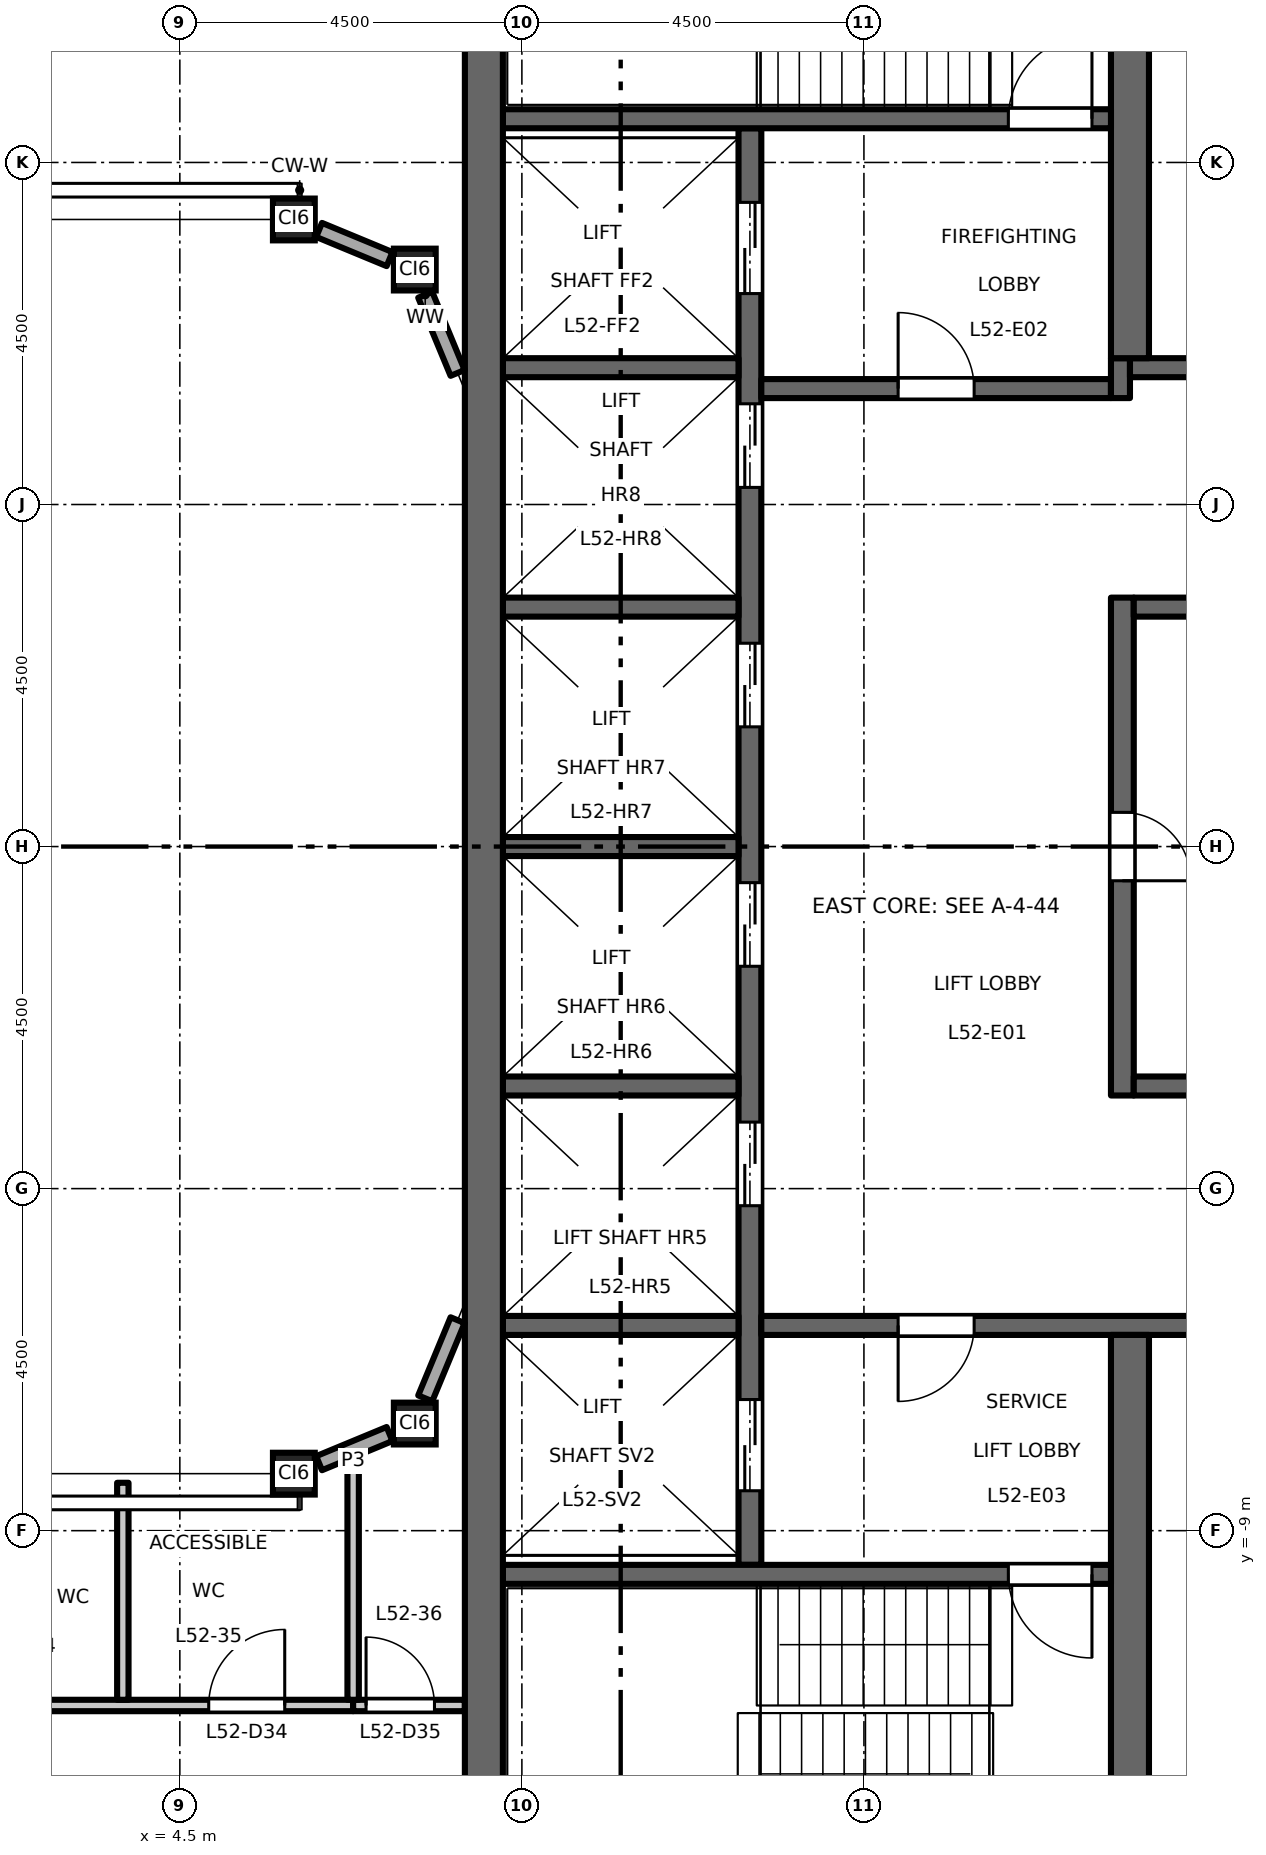
"""IFC4 building model, lengths in metres.
Left out: names, types, materials, properties, quantities, classifications, styles, units other than length and angle.
Written with IfcOpenShell. Run it as: python <this file> out.ifc"""

import sys

from ifc_helpers import new_model, si_unit, direction, frame, frame_2d, origin, origin_2d, place, context, subcontext, project, spatial, rectangle, hollow_rectangle, extrude, element, fill, save


model = new_model("IFC4")
c1 = context("Model", 3, precision=1e-05, world=origin(), true_north=direction((0.0, 1.0)))
c2 = subcontext(c1, "Body", "Model", "MODEL_VIEW")
j1 = project(units=[si_unit("LENGTHUNIT", "METRE"), si_unit("PLANEANGLEUNIT", "RADIAN")], contexts=[c1])
p1 = place(None, origin())
s1 = spatial("IfcSite", under=j1, at=p1, CompositionType="ELEMENT")
p2 = place(p1, origin())
s2 = spatial("IfcBuilding", under=s1, at=p2, CompositionType="ELEMENT")
p3 = place(p2, frame((0.0, 0.0, 242.2)))
s3 = spatial("IfcBuildingStorey", under=s2, at=p3, CompositionType="ELEMENT", Elevation=242.2)
for number, where, z_axis, x_axis in (
    (1, (6.0, -8.25, 0.0), (0.0, 0.0, 1.0), (1.0, 0.0, 0.0)),
    (2, (7.591, -7.591, 0.0), (0.0, 0.0, 1.0), (1.0, 0.0, 0.0)),
    (3, (6.0, 8.25, 0.0), (0.0, 0.0, 1.0), (1.0, 0.0, 0.0)),
    (4, (7.591, 7.591, 0.0), (0.0, 0.0, 1.0), (1.0, 0.0, 0.0)),
):
    element("IfcColumn", number, at=place(p3, frame(where, z_axis=z_axis, x_axis=x_axis)), inside=s3, PredefinedType="COLUMN", context=c2, shape_type="SweptSolid", body=[
        extrude(hollow_rectangle(XDim=0.55, YDim=0.55, WallThickness=0.028, at=origin_2d()), origin(), (0.0, 0.0, 1.0), 4.5),
    ])
p4 = place(p3, frame((12.0, -9.45, 0.0), z_axis=(0.0, 0.0, 1.0), x_axis=(0.0, 1.0, 0.0)))
e5 = element("IfcWall", 5, at=p4, inside=s3, PredefinedType="SHEAR", context=c2, shape_type="SweptSolid", body=[
    extrude(rectangle(XDim=18.9, YDim=0.3, at=frame_2d((9.45, 0.0))), origin(), (0.0, 0.0, 1.0), 4.35),
])
p5 = place(p4, frame((4.725, 0.0, 0.0)))
e6 = element("IfcOpeningElement", 6, at=p5, cuts=e5, PredefinedType="OPENING", context=c2, shape_type="SweptSolid", body=[
    extrude(rectangle(XDim=1.1, YDim=2.1, at=frame_2d((0.55, 1.05))), frame((0.0, 0.16, 0.0), z_axis=(0.0, -1.0, 0.0), x_axis=(1.0, 0.0, 0.0)), (0.0, 0.0, 1.0), 0.32),
])
p6 = place(p4, frame((7.875, 0.0, 0.0)))
e7 = element("IfcOpeningElement", 7, at=p6, cuts=e5, PredefinedType="OPENING", context=c2, shape_type="SweptSolid", body=[
    extrude(rectangle(XDim=1.1, YDim=2.1, at=frame_2d((0.55, 1.05))), frame((0.0, 0.16, 0.0), z_axis=(0.0, -1.0, 0.0), x_axis=(1.0, 0.0, 0.0)), (0.0, 0.0, 1.0), 0.32),
])
p7 = place(p4, frame((11.025, 0.0, 0.0)))
e8 = element("IfcOpeningElement", 8, at=p7, cuts=e5, PredefinedType="OPENING", context=c2, shape_type="SweptSolid", body=[
    extrude(rectangle(XDim=1.1, YDim=2.1, at=frame_2d((0.55, 1.05))), frame((0.0, 0.16, 0.0), z_axis=(0.0, -1.0, 0.0), x_axis=(1.0, 0.0, 0.0)), (0.0, 0.0, 1.0), 0.32),
])
p8 = place(p4, frame((14.175, 0.0, 0.0)))
e9 = element("IfcOpeningElement", 9, at=p8, cuts=e5, PredefinedType="OPENING", context=c2, shape_type="SweptSolid", body=[
    extrude(rectangle(XDim=1.1, YDim=2.1, at=frame_2d((0.55, 1.05))), frame((0.0, 0.16, 0.0), z_axis=(0.0, -1.0, 0.0), x_axis=(1.0, 0.0, 0.0)), (0.0, 0.0, 1.0), 0.32),
])
p9 = place(p4, frame((16.725, 0.0, 0.0)))
e10 = element("IfcOpeningElement", 10, at=p9, cuts=e5, PredefinedType="OPENING", context=c2, shape_type="SweptSolid", body=[
    extrude(rectangle(XDim=1.2, YDim=2.1, at=frame_2d((0.6, 1.05))), frame((0.0, 0.16, 0.0), z_axis=(0.0, -1.0, 0.0), x_axis=(1.0, 0.0, 0.0)), (0.0, 0.0, 1.0), 0.32),
])
p10 = place(p4, frame((0.975, 0.0, 0.0)))
e11 = element("IfcOpeningElement", 11, at=p10, cuts=e5, PredefinedType="OPENING", context=c2, shape_type="SweptSolid", body=[
    extrude(rectangle(XDim=1.2, YDim=2.1, at=frame_2d((0.6, 1.05))), frame((0.0, 0.16, 0.0), z_axis=(0.0, -1.0, 0.0), x_axis=(1.0, 0.0, 0.0)), (0.0, 0.0, 1.0), 0.32),
])
p11 = place(p3, frame((12.15, 6.025, 0.0), z_axis=(0.0, 0.0, 1.0), x_axis=(1.0, 0.0, 0.0)))
e12 = element("IfcWall", 12, at=p11, inside=s3, PredefinedType="SHEAR", context=c2, shape_type="SweptSolid", body=[
    extrude(rectangle(XDim=4.6, YDim=0.25, at=frame_2d((2.3, 0.0))), origin(), (0.0, 0.0, 1.0), 4.35),
])
p12 = place(p11, frame((1.8, 0.0, 0.0)))
e13 = element("IfcOpeningElement", 13, at=p12, cuts=e12, PredefinedType="OPENING", context=c2, shape_type="SweptSolid", body=[
    extrude(rectangle(XDim=1.0, YDim=2.1, at=frame_2d((0.5, 1.05))), frame((0.0, 0.135, 0.0), z_axis=(0.0, -1.0, 0.0), x_axis=(1.0, 0.0, 0.0)), (0.0, 0.0, 1.0), 0.27),
])
p13 = place(p3, frame((16.875, 5.9, 0.0), z_axis=(0.0, 0.0, 1.0), x_axis=(0.0, 1.0, 0.0)))
e14 = element("IfcWall", 14, at=p13, inside=s3, PredefinedType="SHEAR", context=c2, shape_type="SweptSolid", body=[
    extrude(rectangle(XDim=0.525, YDim=0.25, at=frame_2d((0.263, 0.0))), origin(), (0.0, 0.0, 1.0), 4.35),
])
p14 = place(p3, frame((17.0, 6.3, 0.0), z_axis=(0.0, 0.0, 1.0), x_axis=(1.0, 0.0, 0.0)))
e15 = element("IfcWall", 15, at=p14, inside=s3, PredefinedType="SHEAR", context=c2, shape_type="SweptSolid", body=[
    extrude(rectangle(XDim=4.25, YDim=0.25, at=frame_2d((2.125, 0.0))), origin(), (0.0, 0.0, 1.0), 4.35),
])
p15 = place(p3, frame((12.15, -6.3, 0.0), z_axis=(0.0, 0.0, 1.0), x_axis=(1.0, 0.0, 0.0)))
e16 = element("IfcWall", 16, at=p15, inside=s3, PredefinedType="SHEAR", context=c2, shape_type="SweptSolid", body=[
    extrude(rectangle(XDim=9.1, YDim=0.25, at=frame_2d((4.55, 0.0))), origin(), (0.0, 0.0, 1.0), 4.35),
])
p16 = place(p15, frame((1.8, 0.0, 0.0)))
e17 = element("IfcOpeningElement", 17, at=p16, cuts=e16, PredefinedType="OPENING", context=c2, shape_type="SweptSolid", body=[
    extrude(rectangle(XDim=1.0, YDim=2.1, at=frame_2d((0.5, 1.05))), frame((0.0, 0.135, 0.0), z_axis=(0.0, -1.0, 0.0), x_axis=(1.0, 0.0, 0.0)), (0.0, 0.0, 1.0), 0.27),
])
p17 = place(p3, frame((16.9, -3.275, 0.0), z_axis=(0.0, 0.0, 1.0), x_axis=(0.0, 1.0, 0.0)))
e18 = element("IfcWall", 18, at=p17, inside=s3, PredefinedType="SHEAR", context=c2, shape_type="SweptSolid", body=[
    extrude(rectangle(XDim=6.55, YDim=0.3, at=frame_2d((3.275, 0.0))), origin(), (0.0, 0.0, 1.0), 4.35),
])
p18 = place(p17, frame((2.825, 0.0, 0.0)))
e19 = element("IfcOpeningElement", 19, at=p18, cuts=e18, PredefinedType="OPENING", context=c2, shape_type="SweptSolid", body=[
    extrude(rectangle(XDim=0.9, YDim=2.1, at=frame_2d((0.45, 1.05))), frame((0.0, 0.16, 0.0), z_axis=(0.0, -1.0, 0.0), x_axis=(1.0, 0.0, 0.0)), (0.0, 0.0, 1.0), 0.32),
])
for number, where, z_axis, x_axis in (
    (20, (17.05, 3.15, 0.0), (0.0, 0.0, 1.0), (1.0, 0.0, 0.0)),
    (21, (17.05, -3.15, 0.0), (0.0, 0.0, 1.0), (1.0, 0.0, 0.0)),
):
    element("IfcWall", number, at=place(p3, frame(where, z_axis=z_axis, x_axis=x_axis)), inside=s3, PredefinedType="SHEAR", context=c2, shape_type="SweptSolid", body=[
        extrude(rectangle(XDim=4.2, YDim=0.25, at=frame_2d((2.1, 0.0))), origin(), (0.0, 0.0, 1.0), 4.35),
    ])
for number, where, z_axis, x_axis in (
    (22, (17.0, 6.425, 0.0), (0.0, 0.0, 1.0), (0.0, 1.0, 0.0)),
    (23, (17.0, -13.0, 0.0), (0.0, 0.0, 1.0), (0.0, 1.0, 0.0)),
):
    element("IfcWall", number, at=place(p3, frame(where, z_axis=z_axis, x_axis=x_axis)), inside=s3, PredefinedType="SHEAR", context=c2, shape_type="SweptSolid", body=[
        extrude(rectangle(XDim=6.575, YDim=0.5, at=frame_2d((3.288, 0.0))), origin(), (0.0, 0.0, 1.0), 4.35),
    ])
for number, where, z_axis, x_axis in (
    (24, (8.75, 0.0, 0.0), (0.0, 0.0, 1.0), (1.0, 0.0, 0.0)),
    (25, (8.75, 3.15, 0.0), (0.0, 0.0, 1.0), (1.0, 0.0, 0.0)),
    (26, (8.75, 6.3, 0.0), (0.0, 0.0, 1.0), (1.0, 0.0, 0.0)),
    (27, (8.75, -3.15, 0.0), (0.0, 0.0, 1.0), (1.0, 0.0, 0.0)),
    (28, (8.75, -6.3, 0.0), (0.0, 0.0, 1.0), (1.0, 0.0, 0.0)),
):
    element("IfcWall", number, at=place(p3, frame(where, z_axis=z_axis, x_axis=x_axis)), inside=s3, PredefinedType="SHEAR", context=c2, shape_type="SweptSolid", body=[
        extrude(rectangle(XDim=3.1, YDim=0.25, at=frame_2d((1.55, 0.0))), origin(), (0.0, 0.0, 1.0), 4.35),
    ])
p19 = place(p3, frame((8.75, 9.575, 0.0), z_axis=(0.0, 0.0, 1.0), x_axis=(1.0, 0.0, 0.0)))
e29 = element("IfcWall", 29, at=p19, inside=s3, PredefinedType="SHEAR", context=c2, shape_type="SweptSolid", body=[
    extrude(rectangle(XDim=8.0, YDim=0.25, at=frame_2d((4.0, 0.0))), origin(), (0.0, 0.0, 1.0), 4.35),
])
p20 = place(p19, frame((6.65, 0.0, 0.0)))
e30 = element("IfcOpeningElement", 30, at=p20, cuts=e29, PredefinedType="OPENING", context=c2, shape_type="SweptSolid", body=[
    extrude(rectangle(XDim=1.1, YDim=2.1, at=frame_2d((0.55, 1.05))), frame((0.0, 0.135, 0.0), z_axis=(0.0, -1.0, 0.0), x_axis=(1.0, 0.0, 0.0)), (0.0, 0.0, 1.0), 0.27),
])
p21 = place(p3, frame((8.75, -9.575, 0.0), z_axis=(0.0, 0.0, 1.0), x_axis=(1.0, 0.0, 0.0)))
e31 = element("IfcWall", 31, at=p21, inside=s3, PredefinedType="SHEAR", context=c2, shape_type="SweptSolid", body=[
    extrude(rectangle(XDim=8.0, YDim=0.25, at=frame_2d((4.0, 0.0))), origin(), (0.0, 0.0, 1.0), 4.35),
])
p22 = place(p21, frame((6.65, 0.0, 0.0)))
e32 = element("IfcOpeningElement", 32, at=p22, cuts=e31, PredefinedType="OPENING", context=c2, shape_type="SweptSolid", body=[
    extrude(rectangle(XDim=1.1, YDim=2.1, at=frame_2d((0.55, 1.05))), frame((0.0, 0.135, 0.0), z_axis=(0.0, -1.0, 0.0), x_axis=(1.0, 0.0, 0.0)), (0.0, 0.0, 1.0), 0.27),
])
p23 = place(p3, frame((8.5, -13.0, 0.0), z_axis=(0.0, 0.0, 1.0), x_axis=(0.0, 1.0, 0.0)))
e33 = element("IfcWall", 33, at=p23, inside=s3, PredefinedType="SHEAR", context=c2, shape_type="SweptSolid", body=[
    extrude(rectangle(XDim=26.0, YDim=0.5, at=frame_2d((13.0, 0.0))), origin(), (0.0, 0.0, 1.0), 4.35),
])
p24 = place(p3, frame((6.332, -8.113, 0.0), z_axis=(0.0, 0.0, 1.0), x_axis=(0.923859650767, 0.382731427616, 0.0)))
e34 = element("IfcWall", 34, at=p24, inside=s3, PredefinedType="STANDARD", context=c2, shape_type="SweptSolid", body=[
    extrude(rectangle(XDim=1.003, YDim=0.2, at=frame_2d((0.502, 0.0))), origin(), (0.0, 0.0, 1.0), 3.918),
])
for number, where, z_axis, x_axis in (
    (35, (7.729, -7.259, 0.0), (0.0, 0.0, 1.0), (0.383, 0.924, 0.0)),
    (36, (8.154, 6.231, 0.0), (0.0, 0.0, 1.0), (-0.383, 0.924, 0.0)),
):
    element("IfcWall", number, at=place(p3, frame(where, z_axis=z_axis, x_axis=x_axis)), inside=s3, PredefinedType="STANDARD", context=c2, shape_type="SweptSolid", body=[
        extrude(rectangle(XDim=1.113, YDim=0.2, at=frame_2d((0.556, 0.0))), origin(), (0.0, 0.0, 1.0), 3.918),
    ])
p25 = place(p3, frame((7.259, 7.729, 0.0), z_axis=(0.0, 0.0, 1.0), x_axis=(-0.923859650767, 0.382731427616, 0.0)))
e37 = element("IfcWall", 37, at=p25, inside=s3, PredefinedType="STANDARD", context=c2, shape_type="SweptSolid", body=[
    extrude(rectangle(XDim=1.003, YDim=0.2, at=frame_2d((0.502, 0.0))), origin(), (0.0, 0.0, 1.0), 3.918),
])
p26 = place(p3, frame((-8.25, -11.3, 0.0), z_axis=(0.0, 0.0, 1.0), x_axis=(1.0, 0.0, 0.0)))
e38 = element("IfcWall", 38, at=p26, inside=s3, PredefinedType="PARTITIONING", context=c2, shape_type="SweptSolid", body=[
    extrude(rectangle(XDim=15.03, YDim=0.15, at=frame_2d((7.515, 0.0))), origin(), (0.0, 0.0, 1.0), 4.35),
])
p27 = place(p26, frame((2.6, 0.0, 0.0)))
e39 = element("IfcOpeningElement", 39, at=p27, cuts=e38, PredefinedType="OPENING", context=c2, shape_type="SweptSolid", body=[
    extrude(rectangle(XDim=1.0, YDim=2.1, at=frame_2d((0.5, 1.05))), frame((0.0, 0.085, 0.0), z_axis=(0.0, -1.0, 0.0), x_axis=(1.0, 0.0, 0.0)), (0.0, 0.0, 1.0), 0.17),
])
p28 = place(p26, frame((8.85, 0.0, 0.0)))
e40 = element("IfcOpeningElement", 40, at=p28, cuts=e38, PredefinedType="OPENING", context=c2, shape_type="SweptSolid", body=[
    extrude(rectangle(XDim=1.0, YDim=2.1, at=frame_2d((0.5, 1.05))), frame((0.0, 0.085, 0.0), z_axis=(0.0, -1.0, 0.0), x_axis=(1.0, 0.0, 0.0)), (0.0, 0.0, 1.0), 0.17),
])
p29 = place(p26, frame((13.13, 0.0, 0.0)))
e41 = element("IfcOpeningElement", 41, at=p29, cuts=e38, PredefinedType="OPENING", context=c2, shape_type="SweptSolid", body=[
    extrude(rectangle(XDim=1.0, YDim=2.1, at=frame_2d((0.5, 1.05))), frame((0.0, 0.085, 0.0), z_axis=(0.0, -1.0, 0.0), x_axis=(1.0, 0.0, 0.0)), (0.0, 0.0, 1.0), 0.17),
])
p30 = place(p3, frame((6.78, -11.3, 0.0), z_axis=(0.0, 0.0, 1.0), x_axis=(1.0, 0.0, 0.0)))
e42 = element("IfcWall", 42, at=p30, inside=s3, PredefinedType="PARTITIONING", context=c2, shape_type="SweptSolid", body=[
    extrude(rectangle(XDim=1.47, YDim=0.15, at=frame_2d((0.735, 0.0))), origin(), (0.0, 0.0, 1.0), 4.35),
])
p31 = place(p30, frame((0.17, 0.0, 0.0)))
e43 = element("IfcOpeningElement", 43, at=p31, cuts=e42, PredefinedType="OPENING", context=c2, shape_type="SweptSolid", body=[
    extrude(rectangle(XDim=0.9, YDim=2.1, at=frame_2d((0.45, 1.05))), frame((0.0, 0.085, 0.0), z_axis=(0.0, -1.0, 0.0), x_axis=(1.0, 0.0, 0.0)), (0.0, 0.0, 1.0), 0.17),
])
p32 = place(p3, frame((3.75, -11.225, 0.0), z_axis=(0.0, 0.0, 1.0), x_axis=(0.0, 1.0, 0.0)))
e44 = element("IfcWall", 44, at=p32, inside=s3, PredefinedType="PARTITIONING", context=c2, shape_type="SweptSolid", body=[
    extrude(rectangle(XDim=2.855, YDim=0.15, at=frame_2d((1.427, 0.0))), origin(), (0.0, 0.0, 1.0), 4.35),
])
p33 = place(p3, frame((6.78, -11.225, 0.0), z_axis=(0.0, 0.0, 1.0), x_axis=(0.0, 1.0, 0.0)))
e45 = element("IfcWall", 45, at=p33, inside=s3, PredefinedType="PARTITIONING", context=c2, shape_type="SweptSolid", body=[
    extrude(rectangle(XDim=3.138, YDim=0.15, at=frame_2d((1.569, 0.0))), origin(), (0.0, 0.0, 1.0), 4.35),
])
p34 = place(p12, origin())
e46 = element("IfcDoor", 46, at=p34, inside=s3, OperationType="SINGLE_SWING_RIGHT", PredefinedType="DOOR", context=c2, shape_type="SweptSolid", body=[
    extrude(rectangle(XDim=1.0, YDim=2.1, at=frame_2d((0.5, 1.05))), frame((0.0, 0.025, 0.0), z_axis=(0.0, -1.0, 0.0), x_axis=(1.0, 0.0, 0.0)), (0.0, 0.0, 1.0), 0.05),
])
fill(e13, e46)
p35 = place(p16, origin())
e47 = element("IfcDoor", 47, at=p35, inside=s3, OperationType="SINGLE_SWING_LEFT", PredefinedType="DOOR", context=c2, shape_type="SweptSolid", body=[
    extrude(rectangle(XDim=1.0, YDim=2.1, at=frame_2d((0.5, 1.05))), frame((0.0, 0.025, 0.0), z_axis=(0.0, -1.0, 0.0), x_axis=(1.0, 0.0, 0.0)), (0.0, 0.0, 1.0), 0.05),
])
fill(e17, e47)
p36 = place(p20, origin())
e48 = element("IfcDoor", 48, at=p36, inside=s3, OperationType="SINGLE_SWING_LEFT", PredefinedType="DOOR", context=c2, shape_type="SweptSolid", body=[
    extrude(rectangle(XDim=1.1, YDim=2.1, at=frame_2d((0.55, 1.05))), frame((0.0, 0.025, 0.0), z_axis=(0.0, -1.0, 0.0), x_axis=(1.0, 0.0, 0.0)), (0.0, 0.0, 1.0), 0.05),
])
fill(e30, e48)
p37 = place(p22, origin())
e49 = element("IfcDoor", 49, at=p37, inside=s3, OperationType="SINGLE_SWING_RIGHT", PredefinedType="DOOR", context=c2, shape_type="SweptSolid", body=[
    extrude(rectangle(XDim=1.1, YDim=2.1, at=frame_2d((0.55, 1.05))), frame((0.0, 0.025, 0.0), z_axis=(0.0, -1.0, 0.0), x_axis=(1.0, 0.0, 0.0)), (0.0, 0.0, 1.0), 0.05),
])
fill(e32, e49)
p38 = place(p5, origin())
e50 = element("IfcDoor", 50, at=p38, inside=s3, OperationType="DOUBLE_DOOR_SLIDING", PredefinedType="DOOR", context=c2, shape_type="SweptSolid", body=[
    extrude(rectangle(XDim=1.1, YDim=2.1, at=frame_2d((0.55, 1.05))), frame((0.0, 0.025, 0.0), z_axis=(0.0, -1.0, 0.0), x_axis=(1.0, 0.0, 0.0)), (0.0, 0.0, 1.0), 0.05),
])
fill(e6, e50)
p39 = place(p6, origin())
e51 = element("IfcDoor", 51, at=p39, inside=s3, OperationType="DOUBLE_DOOR_SLIDING", PredefinedType="DOOR", context=c2, shape_type="SweptSolid", body=[
    extrude(rectangle(XDim=1.1, YDim=2.1, at=frame_2d((0.55, 1.05))), frame((0.0, 0.025, 0.0), z_axis=(0.0, -1.0, 0.0), x_axis=(1.0, 0.0, 0.0)), (0.0, 0.0, 1.0), 0.05),
])
fill(e7, e51)
p40 = place(p7, origin())
e52 = element("IfcDoor", 52, at=p40, inside=s3, OperationType="DOUBLE_DOOR_SLIDING", PredefinedType="DOOR", context=c2, shape_type="SweptSolid", body=[
    extrude(rectangle(XDim=1.1, YDim=2.1, at=frame_2d((0.55, 1.05))), frame((0.0, 0.025, 0.0), z_axis=(0.0, -1.0, 0.0), x_axis=(1.0, 0.0, 0.0)), (0.0, 0.0, 1.0), 0.05),
])
fill(e8, e52)
p41 = place(p8, origin())
e53 = element("IfcDoor", 53, at=p41, inside=s3, OperationType="DOUBLE_DOOR_SLIDING", PredefinedType="DOOR", context=c2, shape_type="SweptSolid", body=[
    extrude(rectangle(XDim=1.1, YDim=2.1, at=frame_2d((0.55, 1.05))), frame((0.0, 0.025, 0.0), z_axis=(0.0, -1.0, 0.0), x_axis=(1.0, 0.0, 0.0)), (0.0, 0.0, 1.0), 0.05),
])
fill(e9, e53)
p42 = place(p9, origin())
e54 = element("IfcDoor", 54, at=p42, inside=s3, OperationType="DOUBLE_DOOR_SLIDING", PredefinedType="DOOR", context=c2, shape_type="SweptSolid", body=[
    extrude(rectangle(XDim=1.2, YDim=2.1, at=frame_2d((0.6, 1.05))), frame((0.0, 0.025, 0.0), z_axis=(0.0, -1.0, 0.0), x_axis=(1.0, 0.0, 0.0)), (0.0, 0.0, 1.0), 0.05),
])
fill(e10, e54)
p43 = place(p10, origin())
e55 = element("IfcDoor", 55, at=p43, inside=s3, OperationType="DOUBLE_DOOR_SLIDING", PredefinedType="DOOR", context=c2, shape_type="SweptSolid", body=[
    extrude(rectangle(XDim=1.2, YDim=2.1, at=frame_2d((0.6, 1.05))), frame((0.0, 0.025, 0.0), z_axis=(0.0, -1.0, 0.0), x_axis=(1.0, 0.0, 0.0)), (0.0, 0.0, 1.0), 0.05),
])
fill(e11, e55)
p44 = place(p18, origin())
e56 = element("IfcDoor", 56, at=p44, inside=s3, OperationType="SINGLE_SWING_LEFT", PredefinedType="DOOR", context=c2, shape_type="SweptSolid", body=[
    extrude(rectangle(XDim=0.9, YDim=2.1, at=frame_2d((0.45, 1.05))), frame((0.0, 0.025, 0.0), z_axis=(0.0, -1.0, 0.0), x_axis=(1.0, 0.0, 0.0)), (0.0, 0.0, 1.0), 0.05),
])
fill(e19, e56)
p45 = place(p29, origin())
e57 = element("IfcDoor", 57, at=p45, inside=s3, OperationType="SINGLE_SWING_RIGHT", PredefinedType="DOOR", context=c2, shape_type="SweptSolid", body=[
    extrude(rectangle(XDim=1.0, YDim=2.1, at=frame_2d((0.5, 1.05))), frame((0.0, 0.025, 0.0), z_axis=(0.0, -1.0, 0.0), x_axis=(1.0, 0.0, 0.0)), (0.0, 0.0, 1.0), 0.05),
])
fill(e41, e57)
p46 = place(p31, origin())
e58 = element("IfcDoor", 58, at=p46, inside=s3, OperationType="SINGLE_SWING_LEFT", PredefinedType="DOOR", context=c2, shape_type="SweptSolid", body=[
    extrude(rectangle(XDim=0.9, YDim=2.1, at=frame_2d((0.45, 1.05))), frame((0.0, 0.025, 0.0), z_axis=(0.0, -1.0, 0.0), x_axis=(1.0, 0.0, 0.0)), (0.0, 0.0, 1.0), 0.05),
])
fill(e43, e58)
save(model, sys.argv[1])
